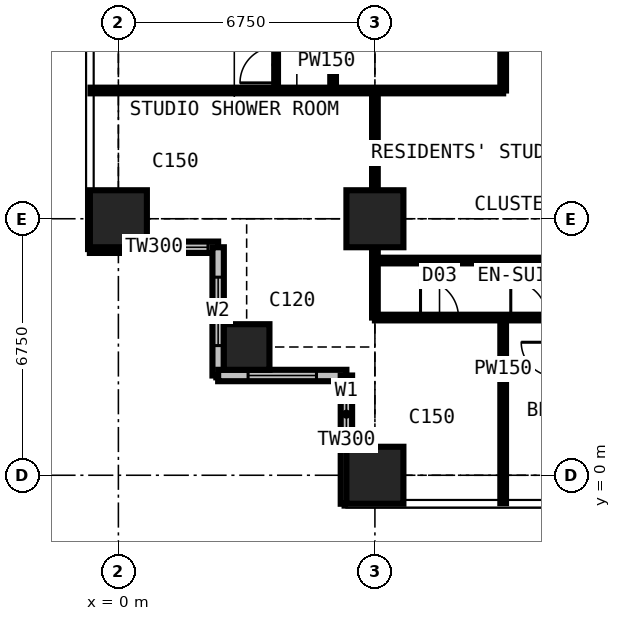
"""IFC4 building model, lengths in metres.
Left out: names, types, materials, properties, quantities, classifications, styles, units other than length and angle.
Written with IfcOpenShell. Run it as: python <this file> out.ifc"""

import sys

from ifc_helpers import new_model, si_unit, direction, frame, frame_2d, origin, origin_2d, place, context, subcontext, project, spatial, rectangle, extrude, element, fill, save


model = new_model("IFC4")
c1 = context("Model", 3, precision=1e-05, world=origin(), true_north=direction((0.0, 1.0)))
c2 = subcontext(c1, "Body", "Model", "MODEL_VIEW")
j1 = project(units=[si_unit("LENGTHUNIT", "METRE"), si_unit("PLANEANGLEUNIT", "RADIAN")], contexts=[c1])
p1 = place(None, origin())
s1 = spatial("IfcSite", under=j1, at=p1, CompositionType="ELEMENT")
p2 = place(p1, origin())
s2 = spatial("IfcBuilding", under=s1, at=p2, CompositionType="ELEMENT")
p3 = place(p2, frame((0.0, 0.0, 160.2)))
s3 = spatial("IfcBuildingStorey", under=s2, at=p3, CompositionType="ELEMENT", Elevation=160.2)
p4 = place(p3, frame((0.0, 6.75, 0.0), z_axis=(0.0, 0.0, 1.0), x_axis=(1.0, 0.0, 0.0)))
e1 = element("IfcColumn", 1, at=p4, inside=s3, PredefinedType="COLUMN", context=c2, shape_type="SweptSolid", body=[
    extrude(rectangle(XDim=1.5, YDim=1.5, at=origin_2d()), origin(), (0.0, 0.0, 1.0), 3.6),
])
p5 = place(p3, frame((3.375, 3.375, 0.0), z_axis=(0.0, 0.0, 1.0), x_axis=(1.0, 0.0, 0.0)))
e2 = element("IfcColumn", 2, at=p5, inside=s3, PredefinedType="COLUMN", context=c2, shape_type="SweptSolid", body=[
    extrude(rectangle(XDim=1.2, YDim=1.2, at=origin_2d()), origin(), (0.0, 0.0, 1.0), 3.6),
])
for number, where, z_axis, x_axis in (
    (3, (6.75, 0.0, 0.0), (0.0, 0.0, 1.0), (1.0, 0.0, 0.0)),
    (4, (6.75, 6.75, 0.0), (0.0, 0.0, 1.0), (1.0, 0.0, 0.0)),
):
    element("IfcColumn", number, at=place(p3, frame(where, z_axis=z_axis, x_axis=x_axis)), inside=s3, PredefinedType="COLUMN", context=c2, shape_type="SweptSolid", body=[
        extrude(rectangle(XDim=1.5, YDim=1.5, at=origin_2d()), origin(), (0.0, 0.0, 1.0), 3.6),
    ])
p6 = place(p3, frame((-0.75, 6.0, 0.0), z_axis=(0.0, 0.0, 1.0), x_axis=(1.0, 0.0, 0.0)))
e5 = element("IfcWall", 5, at=p6, inside=s3, PredefinedType="SOLIDWALL", context=c2, shape_type="SweptSolid", body=[
    extrude(rectangle(XDim=3.375, YDim=0.3, at=frame_2d((1.688, 0.0))), origin(), (0.0, 0.0, 1.0), 3.375),
])
p7 = place(p6, frame((1.607, 0.0, 0.9)))
e6 = element("IfcOpeningElement", 6, at=p7, cuts=e5, PredefinedType="OPENING", context=c2, shape_type="SweptSolid", body=[
    extrude(rectangle(XDim=1.5, YDim=1.8, at=frame_2d((0.75, 0.9))), frame((0.0, 0.16, 0.0), z_axis=(0.0, -1.0, 0.0), x_axis=(1.0, 0.0, 0.0)), (0.0, 0.0, 1.0), 0.32),
])
p8 = place(p3, frame((2.625, 6.0, 0.0), z_axis=(0.0, 0.0, 1.0), x_axis=(0.0, -1.0, 0.0)))
e7 = element("IfcWall", 7, at=p8, inside=s3, PredefinedType="SOLIDWALL", context=c2, shape_type="SweptSolid", body=[
    extrude(rectangle(XDim=3.375, YDim=0.3, at=frame_2d((1.688, 0.0))), origin(), (0.0, 0.0, 1.0), 3.375),
])
p9 = place(p8, frame((0.788, 0.0, 0.6)))
e8 = element("IfcOpeningElement", 8, at=p9, cuts=e7, PredefinedType="OPENING", context=c2, shape_type="SweptSolid", body=[
    extrude(rectangle(XDim=1.8, YDim=2.1, at=frame_2d((0.9, 1.05))), frame((0.0, 0.16, 0.0), z_axis=(0.0, -1.0, 0.0), x_axis=(1.0, 0.0, 0.0)), (0.0, 0.0, 1.0), 0.32),
])
p10 = place(p3, frame((2.625, 2.625, 0.0), z_axis=(0.0, 0.0, 1.0), x_axis=(1.0, 0.0, 0.0)))
e9 = element("IfcWall", 9, at=p10, inside=s3, PredefinedType="SOLIDWALL", context=c2, shape_type="SweptSolid", body=[
    extrude(rectangle(XDim=3.375, YDim=0.3, at=frame_2d((1.688, 0.0))), origin(), (0.0, 0.0, 1.0), 3.375),
])
p11 = place(p10, frame((0.788, 0.0, 0.6)))
e10 = element("IfcOpeningElement", 10, at=p11, cuts=e9, PredefinedType="OPENING", context=c2, shape_type="SweptSolid", body=[
    extrude(rectangle(XDim=1.8, YDim=2.1, at=frame_2d((0.9, 1.05))), frame((0.0, 0.16, 0.0), z_axis=(0.0, -1.0, 0.0), x_axis=(1.0, 0.0, 0.0)), (0.0, 0.0, 1.0), 0.32),
])
p12 = place(p3, frame((6.0, 2.625, 0.0), z_axis=(0.0, 0.0, 1.0), x_axis=(0.0, -1.0, 0.0)))
e11 = element("IfcWall", 11, at=p12, inside=s3, PredefinedType="SOLIDWALL", context=c2, shape_type="SweptSolid", body=[
    extrude(rectangle(XDim=3.375, YDim=0.3, at=frame_2d((1.688, 0.0))), origin(), (0.0, 0.0, 1.0), 3.375),
])
p13 = place(p12, frame((0.268, 0.0, 0.9)))
e12 = element("IfcOpeningElement", 12, at=p13, cuts=e11, PredefinedType="OPENING", context=c2, shape_type="SweptSolid", body=[
    extrude(rectangle(XDim=1.5, YDim=1.8, at=frame_2d((0.75, 0.9))), frame((0.0, 0.16, 0.0), z_axis=(0.0, -1.0, 0.0), x_axis=(1.0, 0.0, 0.0)), (0.0, 0.0, 1.0), 0.32),
])
p14 = place(p3, frame((-0.734, 10.125, 0.0), z_axis=(0.0, 0.0, 1.0), x_axis=(1.0, 0.0, 0.0)))
e13 = element("IfcWall", 13, at=p14, inside=s3, PredefinedType="PARTITIONING", context=c2, shape_type="SweptSolid", body=[
    extrude(rectangle(XDim=10.859, YDim=0.15, at=frame_2d((5.429, 0.0))), origin(), (0.0, 0.0, 1.0), 3.375),
])
p15 = place(p3, frame((4.15, 10.125, 0.0), z_axis=(0.0, 0.0, 1.0), x_axis=(0.0, 1.0, 0.0)))
e14 = element("IfcWall", 14, at=p15, inside=s3, PredefinedType="PARTITIONING", context=c2, shape_type="SweptSolid", body=[
    extrude(rectangle(XDim=16.875, YDim=0.1, at=frame_2d((8.438, 0.0))), origin(), (0.0, 0.0, 1.0), 3.375),
])
p16 = place(p15, frame((0.2, 0.0, 0.0)))
e15 = element("IfcOpeningElement", 15, at=p16, cuts=e14, PredefinedType="OPENING", context=c2, shape_type="SweptSolid", body=[
    extrude(rectangle(XDim=0.95, YDim=2.2, at=frame_2d((0.475, 1.1))), frame((0.0, 0.06, 0.0), z_axis=(0.0, -1.0, 0.0), x_axis=(1.0, 0.0, 0.0)), (0.0, 0.0, 1.0), 0.12),
])
p17 = place(p15, frame((3.625, 0.0, 0.0)))
e16 = element("IfcOpeningElement", 16, at=p17, cuts=e14, PredefinedType="OPENING", context=c2, shape_type="SweptSolid", body=[
    extrude(rectangle(XDim=0.95, YDim=2.2, at=frame_2d((0.475, 1.1))), frame((0.0, 0.06, 0.0), z_axis=(0.0, -1.0, 0.0), x_axis=(1.0, 0.0, 0.0)), (0.0, 0.0, 1.0), 0.12),
])
p18 = place(p15, frame((7.0, 0.0, 0.0)))
e17 = element("IfcOpeningElement", 17, at=p18, cuts=e14, PredefinedType="OPENING", context=c2, shape_type="SweptSolid", body=[
    extrude(rectangle(XDim=0.95, YDim=2.2, at=frame_2d((0.475, 1.1))), frame((0.0, 0.06, 0.0), z_axis=(0.0, -1.0, 0.0), x_axis=(1.0, 0.0, 0.0)), (0.0, 0.0, 1.0), 0.12),
])
p19 = place(p15, frame((10.375, 0.0, 0.0)))
e18 = element("IfcOpeningElement", 18, at=p19, cuts=e14, PredefinedType="OPENING", context=c2, shape_type="SweptSolid", body=[
    extrude(rectangle(XDim=0.95, YDim=2.2, at=frame_2d((0.475, 1.1))), frame((0.0, 0.06, 0.0), z_axis=(0.0, -1.0, 0.0), x_axis=(1.0, 0.0, 0.0)), (0.0, 0.0, 1.0), 0.12),
])
p20 = place(p3, frame((5.65, 10.125, 0.0), z_axis=(0.0, 0.0, 1.0), x_axis=(0.0, 1.0, 0.0)))
e19 = element("IfcWall", 19, at=p20, inside=s3, PredefinedType="PARTITIONING", context=c2, shape_type="SweptSolid", body=[
    extrude(rectangle(XDim=10.762, YDim=0.15, at=frame_2d((5.381, 0.0))), origin(), (0.0, 0.0, 1.0), 3.375),
])
p21 = place(p20, frame((4.9, 0.0, 0.0)))
e20 = element("IfcOpeningElement", 20, at=p21, cuts=e19, PredefinedType="OPENING", context=c2, shape_type="SweptSolid", body=[
    extrude(rectangle(XDim=0.95, YDim=2.2, at=frame_2d((0.475, 1.1))), frame((0.0, 0.085, 0.0), z_axis=(0.0, -1.0, 0.0), x_axis=(1.0, 0.0, 0.0)), (0.0, 0.0, 1.0), 0.17),
])
p22 = place(p3, frame((6.75, 4.15, 0.0), z_axis=(0.0, 0.0, 1.0), x_axis=(0.0, 1.0, 0.0)))
e21 = element("IfcWall", 21, at=p22, inside=s3, PredefinedType="PARTITIONING", context=c2, shape_type="SweptSolid", body=[
    extrude(rectangle(XDim=5.975, YDim=0.15, at=frame_2d((2.988, 0.0))), origin(), (0.0, 0.0, 1.0), 2.877),
])
p23 = place(p3, frame((6.75, 4.15, 0.0), z_axis=(0.0, 0.0, 1.0), x_axis=(1.0, 0.0, 0.0)))
e22 = element("IfcWall", 22, at=p23, inside=s3, PredefinedType="PARTITIONING", context=c2, shape_type="SweptSolid", body=[
    extrude(rectangle(XDim=20.25, YDim=0.15, at=frame_2d((10.125, 0.0))), origin(), (0.0, 0.0, 1.0), 3.375),
])
p24 = place(p23, frame((1.2, 0.0, 0.0)))
e23 = element("IfcOpeningElement", 23, at=p24, cuts=e22, PredefinedType="OPENING", context=c2, shape_type="SweptSolid", body=[
    extrude(rectangle(XDim=1.0, YDim=2.2, at=frame_2d((0.5, 1.1))), frame((0.0, 0.085, 0.0), z_axis=(0.0, -1.0, 0.0), x_axis=(1.0, 0.0, 0.0)), (0.0, 0.0, 1.0), 0.17),
])
p25 = place(p23, frame((3.575, 0.0, 0.0)))
e24 = element("IfcOpeningElement", 24, at=p25, cuts=e22, PredefinedType="OPENING", context=c2, shape_type="SweptSolid", body=[
    extrude(rectangle(XDim=0.95, YDim=2.2, at=frame_2d((0.475, 1.1))), frame((0.0, 0.085, 0.0), z_axis=(0.0, -1.0, 0.0), x_axis=(1.0, 0.0, 0.0)), (0.0, 0.0, 1.0), 0.17),
])
p26 = place(p23, frame((7.0, 0.0, 0.0)))
e25 = element("IfcOpeningElement", 25, at=p26, cuts=e22, PredefinedType="OPENING", context=c2, shape_type="SweptSolid", body=[
    extrude(rectangle(XDim=0.95, YDim=2.2, at=frame_2d((0.475, 1.1))), frame((0.0, 0.085, 0.0), z_axis=(0.0, -1.0, 0.0), x_axis=(1.0, 0.0, 0.0)), (0.0, 0.0, 1.0), 0.17),
])
p27 = place(p23, frame((10.325, 0.0, 0.0)))
e26 = element("IfcOpeningElement", 26, at=p27, cuts=e22, PredefinedType="OPENING", context=c2, shape_type="SweptSolid", body=[
    extrude(rectangle(XDim=0.95, YDim=2.2, at=frame_2d((0.475, 1.1))), frame((0.0, 0.085, 0.0), z_axis=(0.0, -1.0, 0.0), x_axis=(1.0, 0.0, 0.0)), (0.0, 0.0, 1.0), 0.17),
])
p28 = place(p23, frame((13.75, 0.0, 0.0)))
e27 = element("IfcOpeningElement", 27, at=p28, cuts=e22, PredefinedType="OPENING", context=c2, shape_type="SweptSolid", body=[
    extrude(rectangle(XDim=0.95, YDim=2.2, at=frame_2d((0.475, 1.1))), frame((0.0, 0.085, 0.0), z_axis=(0.0, -1.0, 0.0), x_axis=(1.0, 0.0, 0.0)), (0.0, 0.0, 1.0), 0.17),
])
p29 = place(p23, frame((17.125, 0.0, 0.0)))
e28 = element("IfcOpeningElement", 28, at=p29, cuts=e22, PredefinedType="OPENING", context=c2, shape_type="SweptSolid", body=[
    extrude(rectangle(XDim=0.95, YDim=2.2, at=frame_2d((0.475, 1.1))), frame((0.0, 0.085, 0.0), z_axis=(0.0, -1.0, 0.0), x_axis=(1.0, 0.0, 0.0)), (0.0, 0.0, 1.0), 0.17),
])
p30 = place(p3, frame((6.75, 5.65, 0.0), z_axis=(0.0, 0.0, 1.0), x_axis=(1.0, 0.0, 0.0)))
e29 = element("IfcWall", 29, at=p30, inside=s3, PredefinedType="PARTITIONING", context=c2, shape_type="SweptSolid", body=[
    extrude(rectangle(XDim=8.025, YDim=0.15, at=frame_2d((4.012, 0.0))), origin(), (0.0, 0.0, 1.0), 3.375),
])
p31 = place(p3, frame((10.125, -0.734, 0.0), z_axis=(0.0, 0.0, 1.0), x_axis=(0.0, 1.0, 0.0)))
e30 = element("IfcWall", 30, at=p31, inside=s3, PredefinedType="PARTITIONING", context=c2, shape_type="SweptSolid", body=[
    extrude(rectangle(XDim=4.884, YDim=0.15, at=frame_2d((2.442, 0.0))), origin(), (0.0, 0.0, 1.0), 3.375),
])
p32 = place(p3, frame((10.125, 10.125, 0.0), z_axis=(0.0, 0.0, 1.0), x_axis=(0.0, 1.0, 0.0)))
e31 = element("IfcWall", 31, at=p32, inside=s3, PredefinedType="PARTITIONING", context=c2, shape_type="SweptSolid", body=[
    extrude(rectangle(XDim=1.175, YDim=0.15, at=frame_2d((0.587, 0.0))), origin(), (0.0, 0.0, 1.0), 3.375),
])
p33 = place(p7, origin())
e32 = element("IfcWindow", 32, at=p33, inside=s3, PartitioningType="SINGLE_PANEL", PredefinedType="WINDOW", context=c2, shape_type="SweptSolid", body=[
    extrude(rectangle(XDim=1.5, YDim=1.8, at=frame_2d((0.75, 0.9))), frame((0.0, 0.03, 0.0), z_axis=(0.0, -1.0, 0.0), x_axis=(1.0, 0.0, 0.0)), (0.0, 0.0, 1.0), 0.06),
])
fill(e6, e32)
p34 = place(p9, origin())
e33 = element("IfcWindow", 33, at=p34, inside=s3, PartitioningType="SINGLE_PANEL", PredefinedType="WINDOW", context=c2, shape_type="SweptSolid", body=[
    extrude(rectangle(XDim=1.8, YDim=2.1, at=frame_2d((0.9, 1.05))), frame((0.0, 0.03, 0.0), z_axis=(0.0, -1.0, 0.0), x_axis=(1.0, 0.0, 0.0)), (0.0, 0.0, 1.0), 0.06),
])
fill(e8, e33)
p35 = place(p11, origin())
e34 = element("IfcWindow", 34, at=p35, inside=s3, PartitioningType="SINGLE_PANEL", PredefinedType="WINDOW", context=c2, shape_type="SweptSolid", body=[
    extrude(rectangle(XDim=1.8, YDim=2.1, at=frame_2d((0.9, 1.05))), frame((0.0, 0.03, 0.0), z_axis=(0.0, -1.0, 0.0), x_axis=(1.0, 0.0, 0.0)), (0.0, 0.0, 1.0), 0.06),
])
fill(e10, e34)
p36 = place(p13, origin())
e35 = element("IfcWindow", 35, at=p36, inside=s3, PartitioningType="SINGLE_PANEL", PredefinedType="WINDOW", context=c2, shape_type="SweptSolid", body=[
    extrude(rectangle(XDim=1.5, YDim=1.8, at=frame_2d((0.75, 0.9))), frame((0.0, 0.03, 0.0), z_axis=(0.0, -1.0, 0.0), x_axis=(1.0, 0.0, 0.0)), (0.0, 0.0, 1.0), 0.06),
])
fill(e12, e35)
p37 = place(p24, origin())
e36 = element("IfcDoor", 36, at=p37, inside=s3, OperationType="SINGLE_SWING_LEFT", PredefinedType="DOOR", context=c2, shape_type="SweptSolid", body=[
    extrude(rectangle(XDim=1.0, YDim=2.2, at=frame_2d((0.5, 1.1))), frame((0.0, 0.025, 0.0), z_axis=(0.0, -1.0, 0.0), x_axis=(1.0, 0.0, 0.0)), (0.0, 0.0, 1.0), 0.05),
])
fill(e23, e36)
p38 = place(p25, origin())
e37 = element("IfcDoor", 37, at=p38, inside=s3, OperationType="SINGLE_SWING_LEFT", PredefinedType="DOOR", context=c2, shape_type="SweptSolid", body=[
    extrude(rectangle(XDim=0.95, YDim=2.2, at=frame_2d((0.475, 1.1))), frame((0.0, 0.025, 0.0), z_axis=(0.0, -1.0, 0.0), x_axis=(1.0, 0.0, 0.0)), (0.0, 0.0, 1.0), 0.05),
])
fill(e24, e37)
p39 = place(p16, origin())
e38 = element("IfcDoor", 38, at=p39, inside=s3, OperationType="SINGLE_SWING_LEFT", PredefinedType="DOOR", context=c2, shape_type="SweptSolid", body=[
    extrude(rectangle(XDim=0.95, YDim=2.2, at=frame_2d((0.475, 1.1))), frame((0.0, 0.025, 0.0), z_axis=(0.0, -1.0, 0.0), x_axis=(1.0, 0.0, 0.0)), (0.0, 0.0, 1.0), 0.05),
])
fill(e15, e38)
save(model, sys.argv[1])
